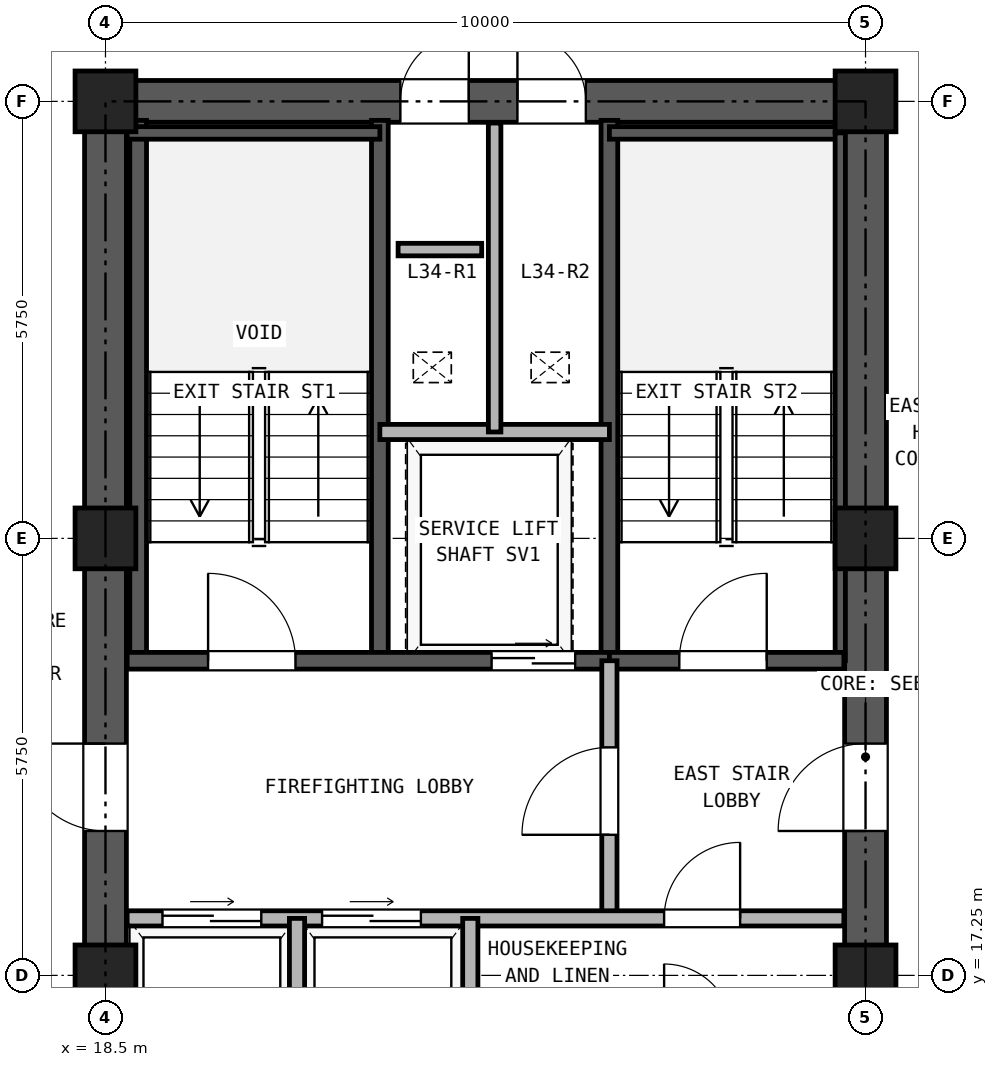
"""IFC4 building model, lengths in metres.
Left out: names, types, materials, properties, quantities, classifications, styles, units other than length and angle.
Written with IfcOpenShell. Run it as: python <this file> out.ifc"""

import sys

from ifc_helpers import new_model, si_unit, direction, frame, frame_2d, origin, origin_2d, place, context, subcontext, project, spatial, rectangle, hollow_rectangle, extrude, source, transform, mapped, element, fill, save


model = new_model("IFC4")
c1 = context("Model", 3, precision=1e-05, world=origin(), true_north=direction((0.0, 1.0)))
c2 = subcontext(c1, "Body", "Model", "MODEL_VIEW")
j1 = project(units=[si_unit("LENGTHUNIT", "METRE"), si_unit("PLANEANGLEUNIT", "RADIAN")], contexts=[c1])
p1 = place(None, origin())
s1 = spatial("IfcSite", under=j1, at=p1, CompositionType="ELEMENT")
p2 = place(p1, origin())
s2 = spatial("IfcBuilding", under=s1, at=p2, CompositionType="ELEMENT")
p3 = place(p2, frame((0.0, 0.0, 124.7)))
s3 = spatial("IfcBuildingStorey", under=s2, at=p3, CompositionType="ELEMENT", Elevation=124.7)
m1 = source(origin(), c2, "Body", "SweptSolid", [
    extrude(hollow_rectangle(XDim=0.8, YDim=0.8, WallThickness=0.045, at=origin_2d()), origin(), (0.0, 0.0, 1.0), 2.95),
])
for number, where, z_axis, x_axis in (
    (1, (18.5, 17.25, 0.0), (0.0, 0.0, 1.0), (1.0, 0.0, 0.0)),
    (2, (18.5, 23.0, 0.0), (0.0, 0.0, 1.0), (1.0, 0.0, 0.0)),
    (3, (18.5, 28.75, 0.0), (0.0, 0.0, 1.0), (1.0, 0.0, 0.0)),
    (4, (28.5, 17.25, 0.0), (0.0, 0.0, 1.0), (1.0, 0.0, 0.0)),
    (5, (28.5, 23.0, 0.0), (0.0, 0.0, 1.0), (1.0, 0.0, 0.0)),
    (6, (28.5, 28.75, 0.0), (0.0, 0.0, 1.0), (1.0, 0.0, 0.0)),
):
    element("IfcColumn", number, at=place(p3, frame(where, z_axis=z_axis, x_axis=x_axis)), inside=s3, PredefinedType="COLUMN", context=c2, shape_type="MappedRepresentation", body=[
        mapped(m1, transform((0.0, 0.0, 0.0), x_axis=(1.0, 0.0, 0.0), y_axis=(0.0, 1.0, 0.0), z_axis=(0.0, 0.0, 1.0), scale=1.0)),
    ])
p4 = place(p3, frame((18.225, 28.75, 0.0), z_axis=(0.0, 0.0, 1.0), x_axis=(1.0, 0.0, 0.0)))
e7 = element("IfcWall", 7, at=p4, inside=s3, PredefinedType="SHEAR", context=c2, shape_type="SweptSolid", body=[
    extrude(rectangle(XDim=10.55, YDim=0.55, at=frame_2d((5.275, 0.0))), origin(), (0.0, 0.0, 1.0), 2.95),
])
p5 = place(p4, frame((4.155, 0.0, 0.0)))
e8 = element("IfcOpeningElement", 8, at=p5, cuts=e7, PredefinedType="OPENING", context=c2, shape_type="SweptSolid", body=[
    extrude(rectangle(XDim=0.9, YDim=2.05, at=frame_2d((0.45, 1.025))), frame((0.0, 0.285, 0.0), z_axis=(0.0, -1.0, 0.0), x_axis=(1.0, 0.0, 0.0)), (0.0, 0.0, 1.0), 0.57),
])
p6 = place(p4, frame((5.695, 0.0, 0.0)))
e9 = element("IfcOpeningElement", 9, at=p6, cuts=e7, PredefinedType="OPENING", context=c2, shape_type="SweptSolid", body=[
    extrude(rectangle(XDim=0.9, YDim=2.05, at=frame_2d((0.45, 1.025))), frame((0.0, 0.285, 0.0), z_axis=(0.0, -1.0, 0.0), x_axis=(1.0, 0.0, 0.0)), (0.0, 0.0, 1.0), 0.57),
])
p7 = place(p3, frame((18.5, 11.775, 0.0), z_axis=(0.0, 0.0, 1.0), x_axis=(0.0, 1.0, 0.0)))
e10 = element("IfcWall", 10, at=p7, inside=s3, PredefinedType="SHEAR", context=c2, shape_type="SweptSolid", body=[
    extrude(rectangle(XDim=16.7, YDim=0.55, at=frame_2d((8.35, 0.0))), origin(), (0.0, 0.0, 1.0), 2.95),
])
p8 = place(p7, frame((7.375, 0.0, 0.0)))
e11 = element("IfcOpeningElement", 11, at=p8, cuts=e10, PredefinedType="OPENING", context=c2, shape_type="SweptSolid", body=[
    extrude(rectangle(XDim=1.15, YDim=2.2, at=frame_2d((0.575, 1.1))), frame((0.0, 0.285, 0.0), z_axis=(0.0, -1.0, 0.0), x_axis=(1.0, 0.0, 0.0)), (0.0, 0.0, 1.0), 0.57),
])
p9 = place(p3, frame((28.5, 11.775, 0.0), z_axis=(0.0, 0.0, 1.0), x_axis=(0.0, 1.0, 0.0)))
e12 = element("IfcWall", 12, at=p9, inside=s3, PredefinedType="SHEAR", context=c2, shape_type="SweptSolid", body=[
    extrude(rectangle(XDim=16.7, YDim=0.55, at=frame_2d((8.35, 0.0))), origin(), (0.0, 0.0, 1.0), 2.95),
])
p10 = place(p9, frame((7.375, 0.0, 0.0)))
e13 = element("IfcOpeningElement", 13, at=p10, cuts=e12, PredefinedType="OPENING", context=c2, shape_type="SweptSolid", body=[
    extrude(rectangle(XDim=1.15, YDim=2.2, at=frame_2d((0.575, 1.1))), frame((0.0, 0.285, 0.0), z_axis=(0.0, -1.0, 0.0), x_axis=(1.0, 0.0, 0.0)), (0.0, 0.0, 1.0), 0.57),
])
for number, where, z_axis, x_axis in (
    (14, (18.93, 21.39, 0.0), (0.0, 0.0, 1.0), (0.0, 1.0, 0.0)),
    (15, (22.11, 21.39, 0.0), (0.0, 0.0, 1.0), (0.0, 1.0, 0.0)),
    (16, (25.13, 21.39, 0.0), (0.0, 0.0, 1.0), (0.0, 1.0, 0.0)),
):
    element("IfcWall", number, at=place(p3, frame(where, z_axis=z_axis, x_axis=x_axis)), inside=s3, PredefinedType="SOLIDWALL", context=c2, shape_type="SweptSolid", body=[
        extrude(rectangle(XDim=7.11, YDim=0.22, at=frame_2d((3.555, 0.0))), origin(), (0.0, 0.0, 1.0), 2.95),
    ])
p11 = place(p3, frame((18.785, 28.335, 0.0), z_axis=(0.0, 0.0, 1.0), x_axis=(1.0, 0.0, 0.0)))
e17 = element("IfcWall", 17, at=p11, inside=s3, PredefinedType="PARTITIONING", context=c2, shape_type="SweptSolid", body=[
    extrude(rectangle(XDim=3.325, YDim=0.165, at=frame_2d((1.663, 0.0))), origin(), (0.0, 0.0, 1.0), 2.95),
])
p12 = place(p3, frame((25.13, 28.335, 0.0), z_axis=(0.0, 0.0, 1.0), x_axis=(1.0, 0.0, 0.0)))
e18 = element("IfcWall", 18, at=p12, inside=s3, PredefinedType="PARTITIONING", context=c2, shape_type="SweptSolid", body=[
    extrude(rectangle(XDim=3.085, YDim=0.165, at=frame_2d((1.542, 0.0))), origin(), (0.0, 0.0, 1.0), 2.95),
])
p13 = place(p3, frame((28.167, 21.39, 0.0), z_axis=(0.0, 0.0, 1.0), x_axis=(0.0, 1.0, 0.0)))
e19 = element("IfcWall", 19, at=p13, inside=s3, PredefinedType="PARTITIONING", context=c2, shape_type="SweptSolid", body=[
    extrude(rectangle(XDim=6.945, YDim=0.135, at=frame_2d((3.473, 0.0))), origin(), (0.0, 0.0, 1.0), 2.95),
])
p14 = place(p3, frame((18.785, 21.39, 0.0), z_axis=(0.0, 0.0, 1.0), x_axis=(1.0, 0.0, 0.0)))
e20 = element("IfcWall", 20, at=p14, inside=s3, PredefinedType="SOLIDWALL", context=c2, shape_type="SweptSolid", body=[
    extrude(rectangle(XDim=6.345, YDim=0.22, at=frame_2d((3.172, 0.0))), origin(), (0.0, 0.0, 1.0), 2.95),
])
p15 = place(p14, frame((1.065, 0.0, 0.0)))
e21 = element("IfcOpeningElement", 21, at=p15, cuts=e20, PredefinedType="OPENING", context=c2, shape_type="SweptSolid", body=[
    extrude(rectangle(XDim=1.15, YDim=2.2, at=frame_2d((0.575, 1.1))), frame((0.0, 0.12, 0.0), z_axis=(0.0, -1.0, 0.0), x_axis=(1.0, 0.0, 0.0)), (0.0, 0.0, 1.0), 0.24),
])
p16 = place(p14, frame((4.795, 0.0, 0.0)))
e22 = element("IfcOpeningElement", 22, at=p16, cuts=e20, PredefinedType="OPENING", context=c2, shape_type="SweptSolid", body=[
    extrude(rectangle(XDim=1.1, YDim=2.25, at=frame_2d((0.55, 1.125))), frame((0.0, 0.12, 0.0), z_axis=(0.0, -1.0, 0.0), x_axis=(1.0, 0.0, 0.0)), (0.0, 0.0, 1.0), 0.24),
])
p17 = place(p3, frame((25.13, 21.39, 0.0), z_axis=(0.0, 0.0, 1.0), x_axis=(1.0, 0.0, 0.0)))
e23 = element("IfcWall", 23, at=p17, inside=s3, PredefinedType="SOLIDWALL", context=c2, shape_type="SweptSolid", body=[
    extrude(rectangle(XDim=3.085, YDim=0.22, at=frame_2d((1.542, 0.0))), origin(), (0.0, 0.0, 1.0), 2.95),
])
p18 = place(p17, frame((0.92, 0.0, 0.0)))
e24 = element("IfcOpeningElement", 24, at=p18, cuts=e23, PredefinedType="OPENING", context=c2, shape_type="SweptSolid", body=[
    extrude(rectangle(XDim=1.15, YDim=2.2, at=frame_2d((0.575, 1.1))), frame((0.0, 0.12, 0.0), z_axis=(0.0, -1.0, 0.0), x_axis=(1.0, 0.0, 0.0)), (0.0, 0.0, 1.0), 0.24),
])
p19 = place(p3, frame((22.11, 24.4, 0.0), z_axis=(0.0, 0.0, 1.0), x_axis=(1.0, 0.0, 0.0)))
e25 = element("IfcWall", 25, at=p19, inside=s3, PredefinedType="PARTITIONING", context=c2, shape_type="SweptSolid", body=[
    extrude(rectangle(XDim=3.02, YDim=0.2, at=frame_2d((1.51, 0.0))), origin(), (0.0, 0.0, 1.0), 2.95),
])
p20 = place(p3, frame((23.62, 24.4, 0.0), z_axis=(0.0, 0.0, 1.0), x_axis=(0.0, 1.0, 0.0)))
e26 = element("IfcWall", 26, at=p20, inside=s3, PredefinedType="PARTITIONING", context=c2, shape_type="SweptSolid", body=[
    extrude(rectangle(XDim=4.065, YDim=0.165, at=frame_2d((2.033, 0.0))), origin(), (0.0, 0.0, 1.0), 2.95),
])
p21 = place(p3, frame((25.13, 18.0, 0.0), z_axis=(0.0, 0.0, 1.0), x_axis=(0.0, 1.0, 0.0)))
e27 = element("IfcWall", 27, at=p21, inside=s3, PredefinedType="PARTITIONING", context=c2, shape_type="SweptSolid", body=[
    extrude(rectangle(XDim=3.39, YDim=0.2, at=frame_2d((1.695, 0.0))), origin(), (0.0, 0.0, 1.0), 2.95),
])
p22 = place(p21, frame((1.1, 0.0, 0.0)))
e28 = element("IfcOpeningElement", 28, at=p22, cuts=e27, PredefinedType="OPENING", context=c2, shape_type="SweptSolid", body=[
    extrude(rectangle(XDim=1.15, YDim=2.2, at=frame_2d((0.575, 1.1))), frame((0.0, 0.11, 0.0), z_axis=(0.0, -1.0, 0.0), x_axis=(1.0, 0.0, 0.0)), (0.0, 0.0, 1.0), 0.22),
])
p23 = place(p3, frame((18.785, 18.0, 0.0), z_axis=(0.0, 0.0, 1.0), x_axis=(1.0, 0.0, 0.0)))
e29 = element("IfcWall", 29, at=p23, inside=s3, PredefinedType="PARTITIONING", context=c2, shape_type="SweptSolid", body=[
    extrude(rectangle(XDim=9.43, YDim=0.2, at=frame_2d((4.715, 0.0))), origin(), (0.0, 0.0, 1.0), 2.95),
])
p24 = place(p23, frame((0.465, 0.0, 0.0)))
e30 = element("IfcOpeningElement", 30, at=p24, cuts=e29, PredefinedType="OPENING", context=c2, shape_type="SweptSolid", body=[
    extrude(rectangle(XDim=1.3, YDim=2.3, at=frame_2d((0.65, 1.15))), frame((0.0, 0.11, 0.0), z_axis=(0.0, -1.0, 0.0), x_axis=(1.0, 0.0, 0.0)), (0.0, 0.0, 1.0), 0.22),
])
p25 = place(p23, frame((2.565, 0.0, 0.0)))
e31 = element("IfcOpeningElement", 31, at=p25, cuts=e29, PredefinedType="OPENING", context=c2, shape_type="SweptSolid", body=[
    extrude(rectangle(XDim=1.3, YDim=2.3, at=frame_2d((0.65, 1.15))), frame((0.0, 0.11, 0.0), z_axis=(0.0, -1.0, 0.0), x_axis=(1.0, 0.0, 0.0)), (0.0, 0.0, 1.0), 0.22),
])
p26 = place(p23, frame((7.065, 0.0, 0.0)))
e32 = element("IfcOpeningElement", 32, at=p26, cuts=e29, PredefinedType="OPENING", context=c2, shape_type="SweptSolid", body=[
    extrude(rectangle(XDim=1.0, YDim=2.15, at=frame_2d((0.5, 1.075))), frame((0.0, 0.11, 0.0), z_axis=(0.0, -1.0, 0.0), x_axis=(1.0, 0.0, 0.0)), (0.0, 0.0, 1.0), 0.22),
])
for number, where, z_axis, x_axis in (
    (33, (21.02, 15.0, 0.0), (0.0, 0.0, 1.0), (0.0, 1.0, 0.0)),
    (34, (23.3, 15.0, 0.0), (0.0, 0.0, 1.0), (0.0, 1.0, 0.0)),
):
    element("IfcWall", number, at=place(p3, frame(where, z_axis=z_axis, x_axis=x_axis)), inside=s3, PredefinedType="PARTITIONING", context=c2, shape_type="SweptSolid", body=[
        extrude(rectangle(XDim=3.0, YDim=0.2, at=frame_2d((1.5, 0.0))), origin(), (0.0, 0.0, 1.0), 2.95),
    ])
p27 = place(p3, frame((22.35, 26.8, 0.0), z_axis=(0.0, 0.0, 1.0), x_axis=(1.0, 0.0, 0.0)))
e35 = element("IfcWall", 35, at=p27, inside=s3, PredefinedType="PARTITIONING", context=c2, shape_type="SweptSolid", body=[
    extrude(rectangle(XDim=1.1, YDim=0.165, at=frame_2d((0.55, 0.0))), origin(), (0.0, 0.0, 1.0), 2.95),
])
p28 = place(p15, frame((1.15, 0.0, 0.0), z_axis=(0.0, 0.0, 1.0), x_axis=(-1.0, 0.0, 0.0)))
e36 = element("IfcDoor", 36, at=p28, inside=s3, OperationType="SINGLE_SWING_LEFT", PredefinedType="DOOR", context=c2, shape_type="SweptSolid", body=[
    extrude(rectangle(XDim=1.15, YDim=2.2, at=frame_2d((0.575, 1.1))), frame((0.0, 0.025, 0.0), z_axis=(0.0, -1.0, 0.0), x_axis=(1.0, 0.0, 0.0)), (0.0, 0.0, 1.0), 0.05),
])
fill(e21, e36)
p29 = place(p18, frame((1.15, 0.0, 0.0), z_axis=(0.0, 0.0, 1.0), x_axis=(-1.0, 0.0, 0.0)))
e37 = element("IfcDoor", 37, at=p29, inside=s3, OperationType="SINGLE_SWING_RIGHT", PredefinedType="DOOR", context=c2, shape_type="SweptSolid", body=[
    extrude(rectangle(XDim=1.15, YDim=2.2, at=frame_2d((0.575, 1.1))), frame((0.0, 0.025, 0.0), z_axis=(0.0, -1.0, 0.0), x_axis=(1.0, 0.0, 0.0)), (0.0, 0.0, 1.0), 0.05),
])
fill(e24, e37)
p30 = place(p16, frame((1.1, 0.0, 0.0), z_axis=(0.0, 0.0, 1.0), x_axis=(-1.0, 0.0, 0.0)))
e38 = element("IfcDoor", 38, at=p30, inside=s3, OperationType="DOUBLE_DOOR_SLIDING", PredefinedType="DOOR", context=c2, shape_type="SweptSolid", body=[
    extrude(rectangle(XDim=1.1, YDim=2.25, at=frame_2d((0.55, 1.125))), frame((0.0, 0.025, 0.0), z_axis=(0.0, -1.0, 0.0), x_axis=(1.0, 0.0, 0.0)), (0.0, 0.0, 1.0), 0.05),
])
fill(e22, e38)
p31 = place(p22, origin())
e39 = element("IfcDoor", 39, at=p31, inside=s3, OperationType="SINGLE_SWING_LEFT", PredefinedType="DOOR", context=c2, shape_type="SweptSolid", body=[
    extrude(rectangle(XDim=1.15, YDim=2.2, at=frame_2d((0.575, 1.1))), frame((0.0, 0.025, 0.0), z_axis=(0.0, -1.0, 0.0), x_axis=(1.0, 0.0, 0.0)), (0.0, 0.0, 1.0), 0.05),
])
fill(e28, e39)
p32 = place(p24, origin())
e40 = element("IfcDoor", 40, at=p32, inside=s3, OperationType="DOUBLE_DOOR_SLIDING", PredefinedType="DOOR", context=c2, shape_type="SweptSolid", body=[
    extrude(rectangle(XDim=1.3, YDim=2.3, at=frame_2d((0.65, 1.15))), frame((0.0, 0.025, 0.0), z_axis=(0.0, -1.0, 0.0), x_axis=(1.0, 0.0, 0.0)), (0.0, 0.0, 1.0), 0.05),
])
fill(e30, e40)
p33 = place(p25, origin())
e41 = element("IfcDoor", 41, at=p33, inside=s3, OperationType="DOUBLE_DOOR_SLIDING", PredefinedType="DOOR", context=c2, shape_type="SweptSolid", body=[
    extrude(rectangle(XDim=1.3, YDim=2.3, at=frame_2d((0.65, 1.15))), frame((0.0, 0.025, 0.0), z_axis=(0.0, -1.0, 0.0), x_axis=(1.0, 0.0, 0.0)), (0.0, 0.0, 1.0), 0.05),
])
fill(e31, e41)
p34 = place(p26, frame((1.0, 0.0, 0.0), z_axis=(0.0, 0.0, 1.0), x_axis=(-1.0, 0.0, 0.0)))
e42 = element("IfcDoor", 42, at=p34, inside=s3, OperationType="SINGLE_SWING_RIGHT", PredefinedType="DOOR", context=c2, shape_type="SweptSolid", body=[
    extrude(rectangle(XDim=1.0, YDim=2.15, at=frame_2d((0.5, 1.075))), frame((0.0, 0.025, 0.0), z_axis=(0.0, -1.0, 0.0), x_axis=(1.0, 0.0, 0.0)), (0.0, 0.0, 1.0), 0.05),
])
fill(e32, e42)
p35 = place(p8, frame((1.15, 0.0, 0.0), z_axis=(0.0, 0.0, 1.0), x_axis=(-1.0, 0.0, 0.0)))
e43 = element("IfcDoor", 43, at=p35, inside=s3, OperationType="SINGLE_SWING_RIGHT", PredefinedType="DOOR", context=c2, shape_type="SweptSolid", body=[
    extrude(rectangle(XDim=1.15, YDim=2.2, at=frame_2d((0.575, 1.1))), frame((0.0, 0.025, 0.0), z_axis=(0.0, -1.0, 0.0), x_axis=(1.0, 0.0, 0.0)), (0.0, 0.0, 1.0), 0.05),
])
fill(e11, e43)
p36 = place(p10, origin())
e44 = element("IfcDoor", 44, at=p36, inside=s3, OperationType="SINGLE_SWING_LEFT", PredefinedType="DOOR", context=c2, shape_type="SweptSolid", body=[
    extrude(rectangle(XDim=1.15, YDim=2.2, at=frame_2d((0.575, 1.1))), frame((0.0, 0.025, 0.0), z_axis=(0.0, -1.0, 0.0), x_axis=(1.0, 0.0, 0.0)), (0.0, 0.0, 1.0), 0.05),
])
fill(e13, e44)
p37 = place(p5, origin())
e45 = element("IfcDoor", 45, at=p37, inside=s3, OperationType="SINGLE_SWING_RIGHT", PredefinedType="DOOR", context=c2, shape_type="SweptSolid", body=[
    extrude(rectangle(XDim=0.9, YDim=2.05, at=frame_2d((0.45, 1.025))), frame((0.0, 0.025, 0.0), z_axis=(0.0, -1.0, 0.0), x_axis=(1.0, 0.0, 0.0)), (0.0, 0.0, 1.0), 0.05),
])
fill(e8, e45)
p38 = place(p6, origin())
e46 = element("IfcDoor", 46, at=p38, inside=s3, OperationType="SINGLE_SWING_LEFT", PredefinedType="DOOR", context=c2, shape_type="SweptSolid", body=[
    extrude(rectangle(XDim=0.9, YDim=2.05, at=frame_2d((0.45, 1.025))), frame((0.0, 0.025, 0.0), z_axis=(0.0, -1.0, 0.0), x_axis=(1.0, 0.0, 0.0)), (0.0, 0.0, 1.0), 0.05),
])
fill(e9, e46)
save(model, sys.argv[1])
